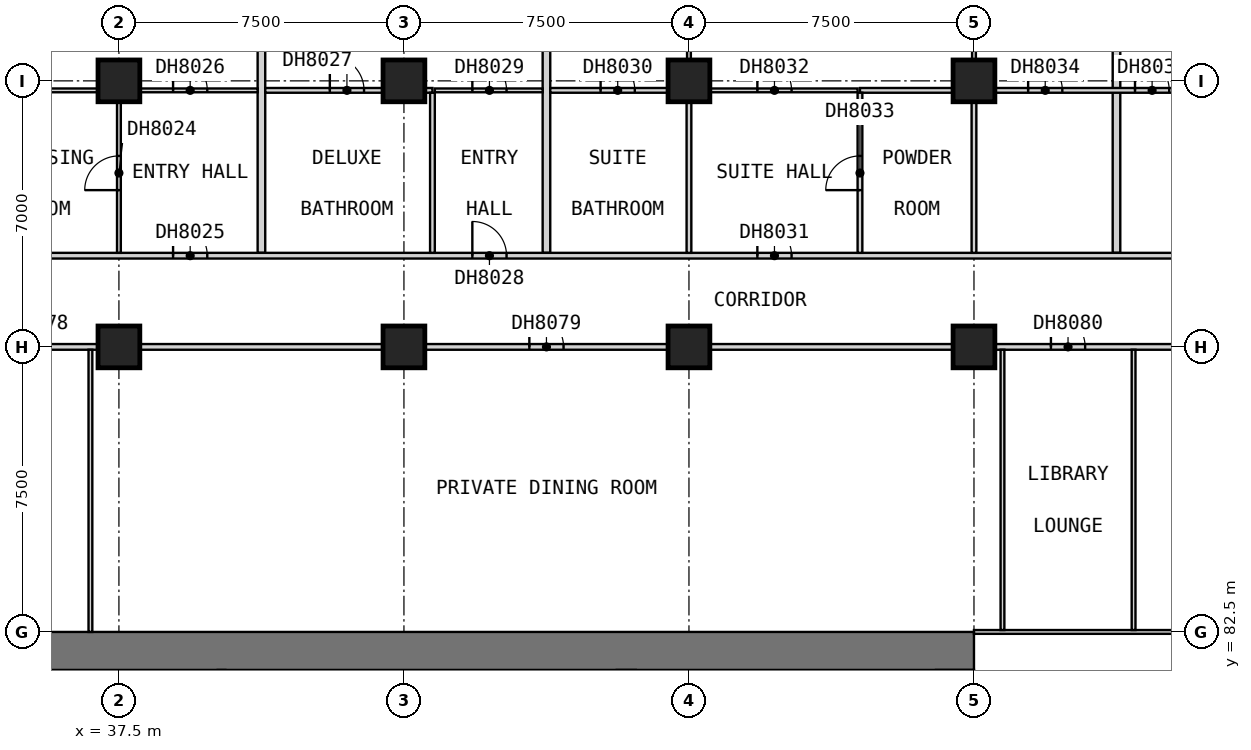
"""IFC4 building model, lengths in metres.
Left out: names, types, materials, properties, quantities, classifications, styles, units other than length and angle.
Written with IfcOpenShell. Run it as: python <this file> out.ifc"""

import sys

from ifc_helpers import new_model, si_unit, direction, frame, frame_2d, origin, origin_2d, place, context, subcontext, project, spatial, rectangle, extrude, element, fill, save


model = new_model("IFC4")
c1 = context("Model", 3, precision=1e-05, world=origin(), true_north=direction((0.0, 1.0)))
c2 = subcontext(c1, "Body", "Model", "MODEL_VIEW")
j1 = project(units=[si_unit("LENGTHUNIT", "METRE"), si_unit("PLANEANGLEUNIT", "RADIAN")], contexts=[c1])
p1 = place(None, origin())
s1 = spatial("IfcSite", under=j1, at=p1, CompositionType="ELEMENT")
p2 = place(p1, origin())
s2 = spatial("IfcBuilding", under=s1, at=p2, CompositionType="ELEMENT")
p3 = place(p2, frame((0.0, 0.0, 89.9)))
s3 = spatial("IfcBuildingStorey", under=s2, at=p3, CompositionType="ELEMENT", Elevation=89.9)
for number, where, z_axis, x_axis in (
    (1, (37.5, 90.0, 0.0), (0.0, 0.0, 1.0), (1.0, 0.0, 0.0)),
    (2, (37.5, 97.0, 0.0), (0.0, 0.0, 1.0), (1.0, 0.0, 0.0)),
    (3, (45.0, 90.0, 0.0), (0.0, 0.0, 1.0), (1.0, 0.0, 0.0)),
    (4, (45.0, 97.0, 0.0), (0.0, 0.0, 1.0), (1.0, 0.0, 0.0)),
    (5, (52.5, 90.0, 0.0), (0.0, 0.0, 1.0), (1.0, 0.0, 0.0)),
    (6, (52.5, 97.0, 0.0), (0.0, 0.0, 1.0), (1.0, 0.0, 0.0)),
    (7, (60.0, 90.0, 0.0), (0.0, 0.0, 1.0), (1.0, 0.0, 0.0)),
    (8, (60.0, 97.0, 0.0), (0.0, 0.0, 1.0), (1.0, 0.0, 0.0)),
):
    element("IfcColumn", number, at=place(p3, frame(where, z_axis=z_axis, x_axis=x_axis)), inside=s3, PredefinedType="COLUMN", context=c2, shape_type="SweptSolid", body=[
        extrude(rectangle(XDim=1.1, YDim=1.1, at=origin_2d()), origin(), (0.0, 0.0, 1.0), 3.6),
    ])
p4 = place(p3, frame((30.0, 82.0, 0.0), z_axis=(0.0, 0.0, 1.0), x_axis=(1.0, 0.0, 0.0)))
e9 = element("IfcWall", 9, at=p4, inside=s3, PredefinedType="SHEAR", context=c2, shape_type="SweptSolid", body=[
    extrude(rectangle(XDim=30.0, YDim=1.0, at=frame_2d((15.0, 0.0))), origin(), (0.0, 0.0, 1.0), 3.6),
])
p5 = place(p3, frame((50.85, 78.3, 0.0), z_axis=(0.0, 0.0, 1.0), x_axis=(0.0, 1.0, 0.0)))
e10 = element("IfcWall", 10, at=p5, inside=s3, PredefinedType="SHEAR", context=c2, shape_type="SweptSolid", body=[
    extrude(rectangle(XDim=3.2, YDim=0.5, at=frame_2d((1.6, 0.0))), origin(), (0.0, 0.0, 1.0), 3.6),
])
for number, where, z_axis, x_axis in (
    (11, (41.25, 92.475, 0.0), (0.0, 0.0, 1.0), (0.0, 1.0, 0.0)),
    (12, (48.75, 92.475, 0.0), (0.0, 0.0, 1.0), (0.0, 1.0, 0.0)),
    (13, (63.75, 92.475, 0.0), (0.0, 0.0, 1.0), (0.0, 1.0, 0.0)),
):
    element("IfcWall", number, at=place(p3, frame(where, z_axis=z_axis, x_axis=x_axis)), inside=s3, PredefinedType="PARTITIONING", context=c2, shape_type="SweptSolid", body=[
        extrude(rectangle(XDim=11.715, YDim=0.2, at=frame_2d((5.857, 0.0))), origin(), (0.0, 0.0, 1.0), 3.35),
    ])
p6 = place(p3, frame((33.75, 90.0, 0.0), z_axis=(0.0, 0.0, 1.0), x_axis=(1.0, 0.0, 0.0)))
e14 = element("IfcWall", 14, at=p6, inside=s3, PredefinedType="PARTITIONING", context=c2, shape_type="SweptSolid", body=[
    extrude(rectangle(XDim=41.25, YDim=0.15, at=frame_2d((20.625, 0.0))), origin(), (0.0, 0.0, 1.0), 3.35),
])
p7 = place(p6, frame((1.05, 0.0, 0.0)))
e15 = element("IfcOpeningElement", 15, at=p7, cuts=e14, PredefinedType="OPENING", context=c2, shape_type="SweptSolid", body=[
    extrude(rectangle(XDim=0.9, YDim=2.1, at=frame_2d((0.45, 1.05))), frame((0.0, 0.085, 0.0), z_axis=(0.0, -1.0, 0.0), x_axis=(1.0, 0.0, 0.0)), (0.0, 0.0, 1.0), 0.17),
])
p8 = place(p6, frame((14.55, 0.0, 0.0)))
e16 = element("IfcOpeningElement", 16, at=p8, cuts=e14, PredefinedType="OPENING", context=c2, shape_type="SweptSolid", body=[
    extrude(rectangle(XDim=0.9, YDim=2.1, at=frame_2d((0.45, 1.05))), frame((0.0, 0.085, 0.0), z_axis=(0.0, -1.0, 0.0), x_axis=(1.0, 0.0, 0.0)), (0.0, 0.0, 1.0), 0.17),
])
p9 = place(p6, frame((28.275, 0.0, 0.0)))
e17 = element("IfcOpeningElement", 17, at=p9, cuts=e14, PredefinedType="OPENING", context=c2, shape_type="SweptSolid", body=[
    extrude(rectangle(XDim=0.9, YDim=2.1, at=frame_2d((0.45, 1.05))), frame((0.0, 0.085, 0.0), z_axis=(0.0, -1.0, 0.0), x_axis=(1.0, 0.0, 0.0)), (0.0, 0.0, 1.0), 0.17),
])
p10 = place(p3, frame((33.75, 92.4, 0.0), z_axis=(0.0, 0.0, 1.0), x_axis=(1.0, 0.0, 0.0)))
e18 = element("IfcWall", 18, at=p10, inside=s3, PredefinedType="PARTITIONING", context=c2, shape_type="SweptSolid", body=[
    extrude(rectangle(XDim=43.65, YDim=0.15, at=frame_2d((21.825, 0.0))), origin(), (0.0, 0.0, 1.0), 3.35),
])
p11 = place(p10, frame((5.175, 0.0, 0.0)))
e19 = element("IfcOpeningElement", 19, at=p11, cuts=e18, PredefinedType="OPENING", context=c2, shape_type="SweptSolid", body=[
    extrude(rectangle(XDim=0.9, YDim=2.1, at=frame_2d((0.45, 1.05))), frame((0.0, 0.085, 0.0), z_axis=(0.0, -1.0, 0.0), x_axis=(1.0, 0.0, 0.0)), (0.0, 0.0, 1.0), 0.17),
])
p12 = place(p10, frame((13.05, 0.0, 0.0)))
e20 = element("IfcOpeningElement", 20, at=p12, cuts=e18, PredefinedType="OPENING", context=c2, shape_type="SweptSolid", body=[
    extrude(rectangle(XDim=0.9, YDim=2.1, at=frame_2d((0.45, 1.05))), frame((0.0, 0.085, 0.0), z_axis=(0.0, -1.0, 0.0), x_axis=(1.0, 0.0, 0.0)), (0.0, 0.0, 1.0), 0.17),
])
p13 = place(p10, frame((20.55, 0.0, 0.0)))
e21 = element("IfcOpeningElement", 21, at=p13, cuts=e18, PredefinedType="OPENING", context=c2, shape_type="SweptSolid", body=[
    extrude(rectangle(XDim=0.9, YDim=2.1, at=frame_2d((0.45, 1.05))), frame((0.0, 0.085, 0.0), z_axis=(0.0, -1.0, 0.0), x_axis=(1.0, 0.0, 0.0)), (0.0, 0.0, 1.0), 0.17),
])
p14 = place(p10, frame((32.363, 0.0, 0.0)))
e22 = element("IfcOpeningElement", 22, at=p14, cuts=e18, PredefinedType="OPENING", context=c2, shape_type="SweptSolid", body=[
    extrude(rectangle(XDim=0.9, YDim=2.1, at=frame_2d((0.45, 1.05))), frame((0.0, 0.085, 0.0), z_axis=(0.0, -1.0, 0.0), x_axis=(1.0, 0.0, 0.0)), (0.0, 0.0, 1.0), 0.17),
])
p15 = place(p10, frame((39.3, 0.0, 0.0)))
e23 = element("IfcOpeningElement", 23, at=p15, cuts=e18, PredefinedType="OPENING", context=c2, shape_type="SweptSolid", body=[
    extrude(rectangle(XDim=0.9, YDim=2.1, at=frame_2d((0.45, 1.05))), frame((0.0, 0.085, 0.0), z_axis=(0.0, -1.0, 0.0), x_axis=(1.0, 0.0, 0.0)), (0.0, 0.0, 1.0), 0.17),
])
p16 = place(p10, frame((42.0, 0.0, 0.0)))
e24 = element("IfcOpeningElement", 24, at=p16, cuts=e18, PredefinedType="OPENING", context=c2, shape_type="SweptSolid", body=[
    extrude(rectangle(XDim=0.9, YDim=2.1, at=frame_2d((0.45, 1.05))), frame((0.0, 0.085, 0.0), z_axis=(0.0, -1.0, 0.0), x_axis=(1.0, 0.0, 0.0)), (0.0, 0.0, 1.0), 0.17),
])
p17 = place(p3, frame((60.0, 82.5, 0.0), z_axis=(0.0, 0.0, 1.0), x_axis=(1.0, 0.0, 0.0)))
e25 = element("IfcWall", 25, at=p17, inside=s3, PredefinedType="PARTITIONING", context=c2, shape_type="SweptSolid", body=[
    extrude(rectangle(XDim=14.925, YDim=0.1, at=frame_2d((7.462, 0.0))), origin(), (0.0, 0.0, 1.0), 3.35),
])
p18 = place(p3, frame((33.812, 96.75, 0.0), z_axis=(0.0, 0.0, 1.0), x_axis=(1.0, 0.0, 0.0)))
e26 = element("IfcWall", 26, at=p18, inside=s3, PredefinedType="PARTITIONING", context=c2, shape_type="SweptSolid", body=[
    extrude(rectangle(XDim=7.337, YDim=0.1, at=frame_2d((3.669, 0.0))), origin(), (0.0, 0.0, 1.0), 3.35),
])
p19 = place(p18, frame((5.113, 0.0, 0.0)))
e27 = element("IfcOpeningElement", 27, at=p19, cuts=e26, PredefinedType="OPENING", context=c2, shape_type="SweptSolid", body=[
    extrude(rectangle(XDim=0.9, YDim=2.1, at=frame_2d((0.45, 1.05))), frame((0.0, 0.06, 0.0), z_axis=(0.0, -1.0, 0.0), x_axis=(1.0, 0.0, 0.0)), (0.0, 0.0, 1.0), 0.12),
])
p20 = place(p3, frame((45.812, 96.75, 0.0), z_axis=(0.0, 0.0, 1.0), x_axis=(1.0, 0.0, 0.0)))
e28 = element("IfcWall", 28, at=p20, inside=s3, PredefinedType="PARTITIONING", context=c2, shape_type="SweptSolid", body=[
    extrude(rectangle(XDim=2.837, YDim=0.1, at=frame_2d((1.419, 0.0))), origin(), (0.0, 0.0, 1.0), 3.35),
])
p21 = place(p20, frame((0.988, 0.0, 0.0)))
e29 = element("IfcOpeningElement", 29, at=p21, cuts=e28, PredefinedType="OPENING", context=c2, shape_type="SweptSolid", body=[
    extrude(rectangle(XDim=0.9, YDim=2.1, at=frame_2d((0.45, 1.05))), frame((0.0, 0.06, 0.0), z_axis=(0.0, -1.0, 0.0), x_axis=(1.0, 0.0, 0.0)), (0.0, 0.0, 1.0), 0.12),
])
p22 = place(p3, frame((52.562, 96.75, 0.0), z_axis=(0.0, 0.0, 1.0), x_axis=(1.0, 0.0, 0.0)))
e30 = element("IfcWall", 30, at=p22, inside=s3, PredefinedType="PARTITIONING", context=c2, shape_type="SweptSolid", body=[
    extrude(rectangle(XDim=4.375, YDim=0.1, at=frame_2d((2.188, 0.0))), origin(), (0.0, 0.0, 1.0), 3.35),
])
p23 = place(p22, frame((1.738, 0.0, 0.0)))
e31 = element("IfcOpeningElement", 31, at=p23, cuts=e30, PredefinedType="OPENING", context=c2, shape_type="SweptSolid", body=[
    extrude(rectangle(XDim=0.9, YDim=2.1, at=frame_2d((0.45, 1.05))), frame((0.0, 0.06, 0.0), z_axis=(0.0, -1.0, 0.0), x_axis=(1.0, 0.0, 0.0)), (0.0, 0.0, 1.0), 0.12),
])
p24 = place(p3, frame((36.75, 82.5, 0.0), z_axis=(0.0, 0.0, 1.0), x_axis=(0.0, 1.0, 0.0)))
e32 = element("IfcWall", 32, at=p24, inside=s3, PredefinedType="PARTITIONING", context=c2, shape_type="SweptSolid", body=[
    extrude(rectangle(XDim=7.425, YDim=0.1, at=frame_2d((3.712, 0.0))), origin(), (0.0, 0.0, 1.0), 3.35),
])
p25 = place(p3, frame((37.5, 92.475, 0.0), z_axis=(0.0, 0.0, 1.0), x_axis=(0.0, 1.0, 0.0)))
e33 = element("IfcWall", 33, at=p25, inside=s3, PredefinedType="PARTITIONING", context=c2, shape_type="SweptSolid", body=[
    extrude(rectangle(XDim=4.225, YDim=0.1, at=frame_2d((2.112, 0.0))), origin(), (0.0, 0.0, 1.0), 3.35),
])
p26 = place(p25, frame((1.65, 0.0, 0.0)))
e34 = element("IfcOpeningElement", 34, at=p26, cuts=e33, PredefinedType="OPENING", context=c2, shape_type="SweptSolid", body=[
    extrude(rectangle(XDim=0.9, YDim=2.1, at=frame_2d((0.45, 1.05))), frame((0.0, 0.06, 0.0), z_axis=(0.0, -1.0, 0.0), x_axis=(1.0, 0.0, 0.0)), (0.0, 0.0, 1.0), 0.12),
])
p27 = place(p3, frame((52.5, 96.812, 0.0), z_axis=(0.0, 0.0, 1.0), x_axis=(0.0, 1.0, 0.0)))
e35 = element("IfcWall", 35, at=p27, inside=s3, PredefinedType="PARTITIONING", context=c2, shape_type="SweptSolid", body=[
    extrude(rectangle(XDim=8.188, YDim=0.1, at=frame_2d((4.094, 0.0))), origin(), (0.0, 0.0, 1.0), 3.35),
])
p28 = place(p27, frame((3.613, 0.0, 0.0)))
e36 = element("IfcOpeningElement", 36, at=p28, cuts=e35, PredefinedType="OPENING", context=c2, shape_type="SweptSolid", body=[
    extrude(rectangle(XDim=0.9, YDim=2.1, at=frame_2d((0.45, 1.05))), frame((0.0, 0.06, 0.0), z_axis=(0.0, -1.0, 0.0), x_axis=(1.0, 0.0, 0.0)), (0.0, 0.0, 1.0), 0.12),
])
p29 = place(p3, frame((60.0, 96.812, 0.0), z_axis=(0.0, 0.0, 1.0), x_axis=(0.0, 1.0, 0.0)))
e37 = element("IfcWall", 37, at=p29, inside=s3, PredefinedType="PARTITIONING", context=c2, shape_type="SweptSolid", body=[
    extrude(rectangle(XDim=8.188, YDim=0.1, at=frame_2d((4.094, 0.0))), origin(), (0.0, 0.0, 1.0), 3.35),
])
p30 = place(p29, frame((3.613, 0.0, 0.0)))
e38 = element("IfcOpeningElement", 38, at=p30, cuts=e37, PredefinedType="OPENING", context=c2, shape_type="SweptSolid", body=[
    extrude(rectangle(XDim=0.9, YDim=2.1, at=frame_2d((0.45, 1.05))), frame((0.0, 0.06, 0.0), z_axis=(0.0, -1.0, 0.0), x_axis=(1.0, 0.0, 0.0)), (0.0, 0.0, 1.0), 0.12),
])
for number, where, z_axis, x_axis in (
    (39, (60.75, 82.55, 0.0), (0.0, 0.0, 1.0), (0.0, 1.0, 0.0)),
    (40, (64.2, 82.55, 0.0), (0.0, 0.0, 1.0), (0.0, 1.0, 0.0)),
):
    element("IfcWall", number, at=place(p3, frame(where, z_axis=z_axis, x_axis=x_axis)), inside=s3, PredefinedType="PARTITIONING", context=c2, shape_type="SweptSolid", body=[
        extrude(rectangle(XDim=7.375, YDim=0.1, at=frame_2d((3.688, 0.0))), origin(), (0.0, 0.0, 1.0), 3.35),
    ])
p31 = place(p3, frame((41.35, 96.75, 0.0), z_axis=(0.0, 0.0, 1.0), x_axis=(1.0, 0.0, 0.0)))
e41 = element("IfcWall", 41, at=p31, inside=s3, PredefinedType="PARTITIONING", context=c2, shape_type="SweptSolid", body=[
    extrude(rectangle(XDim=4.4, YDim=0.125, at=frame_2d((2.2, 0.0))), origin(), (0.0, 0.0, 1.0), 3.35),
])
p32 = place(p31, frame((1.7, 0.0, 0.0)))
e42 = element("IfcOpeningElement", 42, at=p32, cuts=e41, PredefinedType="OPENING", context=c2, shape_type="SweptSolid", body=[
    extrude(rectangle(XDim=0.9, YDim=2.1, at=frame_2d((0.45, 1.05))), frame((0.0, 0.073, 0.0), z_axis=(0.0, -1.0, 0.0), x_axis=(1.0, 0.0, 0.0)), (0.0, 0.0, 1.0), 0.145),
])
p33 = place(p3, frame((48.85, 96.75, 0.0), z_axis=(0.0, 0.0, 1.0), x_axis=(1.0, 0.0, 0.0)))
e43 = element("IfcWall", 43, at=p33, inside=s3, PredefinedType="PARTITIONING", context=c2, shape_type="SweptSolid", body=[
    extrude(rectangle(XDim=3.65, YDim=0.125, at=frame_2d((1.825, 0.0))), origin(), (0.0, 0.0, 1.0), 3.35),
])
p34 = place(p33, frame((1.325, 0.0, 0.0)))
e44 = element("IfcOpeningElement", 44, at=p34, cuts=e43, PredefinedType="OPENING", context=c2, shape_type="SweptSolid", body=[
    extrude(rectangle(XDim=0.9, YDim=2.1, at=frame_2d((0.45, 1.05))), frame((0.0, 0.073, 0.0), z_axis=(0.0, -1.0, 0.0), x_axis=(1.0, 0.0, 0.0)), (0.0, 0.0, 1.0), 0.145),
])
p35 = place(p3, frame((57.0, 96.75, 0.0), z_axis=(0.0, 0.0, 1.0), x_axis=(1.0, 0.0, 0.0)))
e45 = element("IfcWall", 45, at=p35, inside=s3, PredefinedType="PARTITIONING", context=c2, shape_type="SweptSolid", body=[
    extrude(rectangle(XDim=8.625, YDim=0.125, at=frame_2d((4.312, 0.0))), origin(), (0.0, 0.0, 1.0), 3.35),
])
p36 = place(p35, frame((4.425, 0.0, 0.0)))
e46 = element("IfcOpeningElement", 46, at=p36, cuts=e45, PredefinedType="OPENING", context=c2, shape_type="SweptSolid", body=[
    extrude(rectangle(XDim=0.9, YDim=2.1, at=frame_2d((0.45, 1.05))), frame((0.0, 0.073, 0.0), z_axis=(0.0, -1.0, 0.0), x_axis=(1.0, 0.0, 0.0)), (0.0, 0.0, 1.0), 0.145),
])
p37 = place(p35, frame((7.238, 0.0, 0.0)))
e47 = element("IfcOpeningElement", 47, at=p37, cuts=e45, PredefinedType="OPENING", context=c2, shape_type="SweptSolid", body=[
    extrude(rectangle(XDim=0.9, YDim=2.1, at=frame_2d((0.45, 1.05))), frame((0.0, 0.073, 0.0), z_axis=(0.0, -1.0, 0.0), x_axis=(1.0, 0.0, 0.0)), (0.0, 0.0, 1.0), 0.145),
])
for number, where, z_axis, x_axis in (
    (48, (45.75, 92.475, 0.0), (0.0, 0.0, 1.0), (0.0, 1.0, 0.0)),
    (49, (52.5, 92.475, 0.0), (0.0, 0.0, 1.0), (0.0, 1.0, 0.0)),
):
    element("IfcWall", number, at=place(p3, frame(where, z_axis=z_axis, x_axis=x_axis)), inside=s3, PredefinedType="PARTITIONING", context=c2, shape_type="SweptSolid", body=[
        extrude(rectangle(XDim=4.212, YDim=0.125, at=frame_2d((2.106, 0.0))), origin(), (0.0, 0.0, 1.0), 3.35),
    ])
p38 = place(p3, frame((57.0, 92.475, 0.0), z_axis=(0.0, 0.0, 1.0), x_axis=(0.0, 1.0, 0.0)))
e50 = element("IfcWall", 50, at=p38, inside=s3, PredefinedType="PARTITIONING", context=c2, shape_type="SweptSolid", body=[
    extrude(rectangle(XDim=4.212, YDim=0.125, at=frame_2d((2.106, 0.0))), origin(), (0.0, 0.0, 1.0), 3.35),
])
p39 = place(p38, frame((1.65, 0.0, 0.0)))
e51 = element("IfcOpeningElement", 51, at=p39, cuts=e50, PredefinedType="OPENING", context=c2, shape_type="SweptSolid", body=[
    extrude(rectangle(XDim=0.9, YDim=2.1, at=frame_2d((0.45, 1.05))), frame((0.0, 0.073, 0.0), z_axis=(0.0, -1.0, 0.0), x_axis=(1.0, 0.0, 0.0)), (0.0, 0.0, 1.0), 0.145),
])
p40 = place(p3, frame((60.0, 92.475, 0.0), z_axis=(0.0, 0.0, 1.0), x_axis=(0.0, 1.0, 0.0)))
e52 = element("IfcWall", 52, at=p40, inside=s3, PredefinedType="PARTITIONING", context=c2, shape_type="SweptSolid", body=[
    extrude(rectangle(XDim=4.212, YDim=0.125, at=frame_2d((2.106, 0.0))), origin(), (0.0, 0.0, 1.0), 3.35),
])
p41 = place(p26, origin())
e53 = element("IfcDoor", 53, at=p41, inside=s3, OperationType="SINGLE_SWING_RIGHT", PredefinedType="DOOR", context=c2, shape_type="SweptSolid", body=[
    extrude(rectangle(XDim=0.9, YDim=2.1, at=frame_2d((0.45, 1.05))), frame((0.0, 0.025, 0.0), z_axis=(0.0, -1.0, 0.0), x_axis=(1.0, 0.0, 0.0)), (0.0, 0.0, 1.0), 0.05),
])
fill(e34, e53)
p42 = place(p11, origin())
e54 = element("IfcDoor", 54, at=p42, inside=s3, OperationType="SINGLE_SWING_LEFT", PredefinedType="DOOR", context=c2, shape_type="SweptSolid", body=[
    extrude(rectangle(XDim=0.9, YDim=2.1, at=frame_2d((0.45, 1.05))), frame((0.0, 0.025, 0.0), z_axis=(0.0, -1.0, 0.0), x_axis=(1.0, 0.0, 0.0)), (0.0, 0.0, 1.0), 0.05),
])
fill(e19, e54)
p43 = place(p19, origin())
e55 = element("IfcDoor", 55, at=p43, inside=s3, OperationType="SINGLE_SWING_RIGHT", PredefinedType="DOOR", context=c2, shape_type="SweptSolid", body=[
    extrude(rectangle(XDim=0.9, YDim=2.1, at=frame_2d((0.45, 1.05))), frame((0.0, 0.025, 0.0), z_axis=(0.0, -1.0, 0.0), x_axis=(1.0, 0.0, 0.0)), (0.0, 0.0, 1.0), 0.05),
])
fill(e27, e55)
p44 = place(p32, origin())
e56 = element("IfcDoor", 56, at=p44, inside=s3, OperationType="SINGLE_SWING_RIGHT", PredefinedType="DOOR", context=c2, shape_type="SweptSolid", body=[
    extrude(rectangle(XDim=0.9, YDim=2.1, at=frame_2d((0.45, 1.05))), frame((0.0, 0.025, 0.0), z_axis=(0.0, -1.0, 0.0), x_axis=(1.0, 0.0, 0.0)), (0.0, 0.0, 1.0), 0.05),
])
fill(e42, e56)
p45 = place(p12, origin())
e57 = element("IfcDoor", 57, at=p45, inside=s3, OperationType="SINGLE_SWING_LEFT", PredefinedType="DOOR", context=c2, shape_type="SweptSolid", body=[
    extrude(rectangle(XDim=0.9, YDim=2.1, at=frame_2d((0.45, 1.05))), frame((0.0, 0.025, 0.0), z_axis=(0.0, -1.0, 0.0), x_axis=(1.0, 0.0, 0.0)), (0.0, 0.0, 1.0), 0.05),
])
fill(e20, e57)
p46 = place(p21, origin())
e58 = element("IfcDoor", 58, at=p46, inside=s3, OperationType="SINGLE_SWING_RIGHT", PredefinedType="DOOR", context=c2, shape_type="SweptSolid", body=[
    extrude(rectangle(XDim=0.9, YDim=2.1, at=frame_2d((0.45, 1.05))), frame((0.0, 0.025, 0.0), z_axis=(0.0, -1.0, 0.0), x_axis=(1.0, 0.0, 0.0)), (0.0, 0.0, 1.0), 0.05),
])
fill(e29, e58)
p47 = place(p34, origin())
e59 = element("IfcDoor", 59, at=p47, inside=s3, OperationType="SINGLE_SWING_RIGHT", PredefinedType="DOOR", context=c2, shape_type="SweptSolid", body=[
    extrude(rectangle(XDim=0.9, YDim=2.1, at=frame_2d((0.45, 1.05))), frame((0.0, 0.025, 0.0), z_axis=(0.0, -1.0, 0.0), x_axis=(1.0, 0.0, 0.0)), (0.0, 0.0, 1.0), 0.05),
])
fill(e44, e59)
p48 = place(p13, origin())
e60 = element("IfcDoor", 60, at=p48, inside=s3, OperationType="SINGLE_SWING_LEFT", PredefinedType="DOOR", context=c2, shape_type="SweptSolid", body=[
    extrude(rectangle(XDim=0.9, YDim=2.1, at=frame_2d((0.45, 1.05))), frame((0.0, 0.025, 0.0), z_axis=(0.0, -1.0, 0.0), x_axis=(1.0, 0.0, 0.0)), (0.0, 0.0, 1.0), 0.05),
])
fill(e21, e60)
p49 = place(p23, origin())
e61 = element("IfcDoor", 61, at=p49, inside=s3, OperationType="SINGLE_SWING_RIGHT", PredefinedType="DOOR", context=c2, shape_type="SweptSolid", body=[
    extrude(rectangle(XDim=0.9, YDim=2.1, at=frame_2d((0.45, 1.05))), frame((0.0, 0.025, 0.0), z_axis=(0.0, -1.0, 0.0), x_axis=(1.0, 0.0, 0.0)), (0.0, 0.0, 1.0), 0.05),
])
fill(e31, e61)
p50 = place(p39, origin())
e62 = element("IfcDoor", 62, at=p50, inside=s3, OperationType="SINGLE_SWING_LEFT", PredefinedType="DOOR", context=c2, shape_type="SweptSolid", body=[
    extrude(rectangle(XDim=0.9, YDim=2.1, at=frame_2d((0.45, 1.05))), frame((0.0, 0.025, 0.0), z_axis=(0.0, -1.0, 0.0), x_axis=(1.0, 0.0, 0.0)), (0.0, 0.0, 1.0), 0.05),
])
fill(e51, e62)
p51 = place(p36, origin())
e63 = element("IfcDoor", 63, at=p51, inside=s3, OperationType="SINGLE_SWING_RIGHT", PredefinedType="DOOR", context=c2, shape_type="SweptSolid", body=[
    extrude(rectangle(XDim=0.9, YDim=2.1, at=frame_2d((0.45, 1.05))), frame((0.0, 0.025, 0.0), z_axis=(0.0, -1.0, 0.0), x_axis=(1.0, 0.0, 0.0)), (0.0, 0.0, 1.0), 0.05),
])
fill(e46, e63)
p52 = place(p37, origin())
e64 = element("IfcDoor", 64, at=p52, inside=s3, OperationType="SINGLE_SWING_RIGHT", PredefinedType="DOOR", context=c2, shape_type="SweptSolid", body=[
    extrude(rectangle(XDim=0.9, YDim=2.1, at=frame_2d((0.45, 1.05))), frame((0.0, 0.025, 0.0), z_axis=(0.0, -1.0, 0.0), x_axis=(1.0, 0.0, 0.0)), (0.0, 0.0, 1.0), 0.05),
])
fill(e47, e64)
p53 = place(p8, origin())
e65 = element("IfcDoor", 65, at=p53, inside=s3, OperationType="SINGLE_SWING_RIGHT", PredefinedType="DOOR", context=c2, shape_type="SweptSolid", body=[
    extrude(rectangle(XDim=0.9, YDim=2.1, at=frame_2d((0.45, 1.05))), frame((0.0, 0.025, 0.0), z_axis=(0.0, -1.0, 0.0), x_axis=(1.0, 0.0, 0.0)), (0.0, 0.0, 1.0), 0.05),
])
fill(e16, e65)
p54 = place(p9, origin())
e66 = element("IfcDoor", 66, at=p54, inside=s3, OperationType="SINGLE_SWING_RIGHT", PredefinedType="DOOR", context=c2, shape_type="SweptSolid", body=[
    extrude(rectangle(XDim=0.9, YDim=2.1, at=frame_2d((0.45, 1.05))), frame((0.0, 0.025, 0.0), z_axis=(0.0, -1.0, 0.0), x_axis=(1.0, 0.0, 0.0)), (0.0, 0.0, 1.0), 0.05),
])
fill(e17, e66)
save(model, sys.argv[1])
